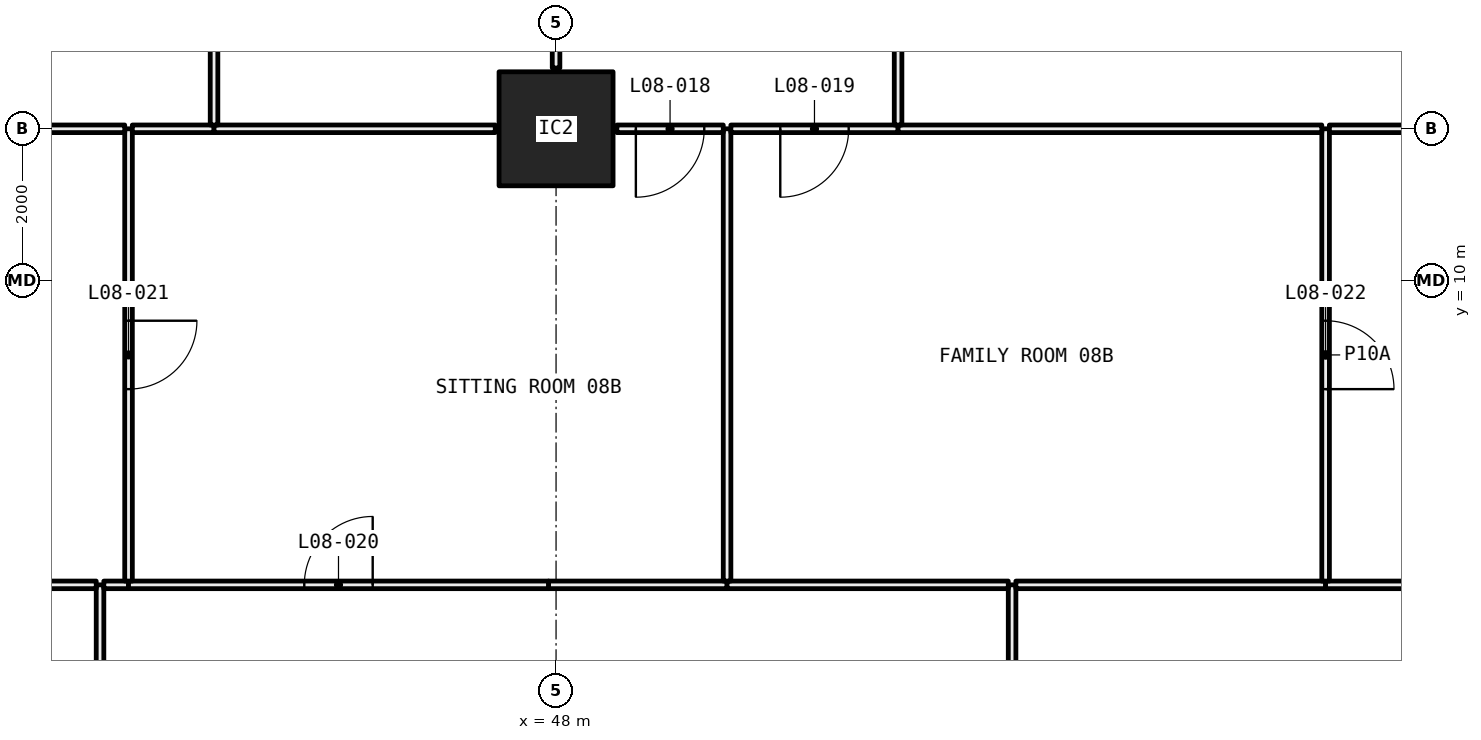
"""IFC4 building model, lengths in metres.
Left out: names, types, materials, properties, quantities, classifications, styles, units other than length and angle.
Written with IfcOpenShell. Run it as: python <this file> out.ifc"""

import sys

from ifc_helpers import new_model, si_unit, direction, frame, frame_2d, origin, origin_2d, place, context, subcontext, project, spatial, rectangle, hollow_rectangle, extrude, element, fill, save


model = new_model("IFC4")
c1 = context("Model", 3, precision=1e-05, world=origin(), true_north=direction((0.0, 1.0)))
c2 = subcontext(c1, "Body", "Model", "MODEL_VIEW")
j1 = project(units=[si_unit("LENGTHUNIT", "METRE"), si_unit("PLANEANGLEUNIT", "RADIAN")], contexts=[c1])
p1 = place(None, origin())
s1 = spatial("IfcSite", under=j1, at=p1, CompositionType="ELEMENT")
p2 = place(p1, origin())
s2 = spatial("IfcBuilding", under=s1, at=p2, CompositionType="ELEMENT")
p3 = place(p2, frame((0.0, 0.0, 40.35)))
s3 = spatial("IfcBuildingStorey", under=s2, at=p3, CompositionType="ELEMENT", Elevation=40.35)
p4 = place(p3, frame((48.0, 12.0, 0.0), z_axis=(0.0, 0.0, 1.0), x_axis=(1.0, 0.0, 0.0)))
e1 = element("IfcColumn", 1, at=p4, inside=s3, PredefinedType="COLUMN", context=c2, shape_type="SweptSolid", body=[
    extrude(hollow_rectangle(XDim=1.5, YDim=1.5, WallThickness=0.065, at=origin_2d()), origin(), (0.0, 0.0, 1.0), 3.05),
])
p5 = place(p3, frame((42.0, 0.72, 0.0), z_axis=(0.0, 0.0, 1.0), x_axis=(0.0, 1.0, 0.0)))
e2 = element("IfcWall", 2, at=p5, inside=s3, PredefinedType="PARTITIONING", context=c2, shape_type="SweptSolid", body=[
    extrude(rectangle(XDim=5.28, YDim=0.1, at=frame_2d((2.64, 0.0))), origin(), (0.0, 0.0, 1.0), 3.05),
])
p6 = place(p5, frame((2.19, 0.0, 0.0)))
e3 = element("IfcOpeningElement", 3, at=p6, cuts=e2, PredefinedType="OPENING", context=c2, shape_type="SweptSolid", body=[
    extrude(rectangle(XDim=0.9, YDim=2.1, at=frame_2d((0.45, 1.05))), frame((0.0, 0.06, 0.0), z_axis=(0.0, -1.0, 0.0), x_axis=(1.0, 0.0, 0.0)), (0.0, 0.0, 1.0), 0.12),
])
p7 = place(p3, frame((41.95, 6.0, 0.0), z_axis=(0.0, 0.0, 1.0), x_axis=(-1.0, 0.0, 0.0)))
e4 = element("IfcWall", 4, at=p7, inside=s3, PredefinedType="PARTITIONING", context=c2, shape_type="SweptSolid", body=[
    extrude(rectangle(XDim=5.9, YDim=0.1, at=frame_2d((2.95, 0.0))), origin(), (0.0, 0.0, 1.0), 2.45),
])
p8 = place(p3, frame((54.0, 0.72, 0.0), z_axis=(0.0, 0.0, 1.0), x_axis=(0.0, 1.0, 0.0)))
e5 = element("IfcWall", 5, at=p8, inside=s3, PredefinedType="PARTITIONING", context=c2, shape_type="SweptSolid", body=[
    extrude(rectangle(XDim=5.28, YDim=0.1, at=frame_2d((2.64, 0.0))), origin(), (0.0, 0.0, 1.0), 3.05),
])
p9 = place(p8, frame((2.19, 0.0, 0.0)))
e6 = element("IfcOpeningElement", 6, at=p9, cuts=e5, PredefinedType="OPENING", context=c2, shape_type="SweptSolid", body=[
    extrude(rectangle(XDim=0.9, YDim=2.1, at=frame_2d((0.45, 1.05))), frame((0.0, 0.06, 0.0), z_axis=(0.0, -1.0, 0.0), x_axis=(1.0, 0.0, 0.0)), (0.0, 0.0, 1.0), 0.12),
])
p10 = place(p3, frame((42.375, 6.0, 0.0), z_axis=(0.0, 0.0, 1.0), x_axis=(-1.0, 0.0, 0.0)))
e7 = element("IfcWall", 7, at=p10, inside=s3, PredefinedType="PARTITIONING", context=c2, shape_type="SweptSolid", body=[
    extrude(rectangle(XDim=0.325, YDim=0.1, at=frame_2d((0.163, 0.0))), origin(), (0.0, 0.0, 1.0), 3.05),
])
p11 = place(p3, frame((50.25, 6.0, 0.0), z_axis=(0.0, 0.0, 1.0), x_axis=(-1.0, 0.0, 0.0)))
e8 = element("IfcWall", 8, at=p11, inside=s3, PredefinedType="PARTITIONING", context=c2, shape_type="SweptSolid", body=[
    extrude(rectangle(XDim=2.35, YDim=0.1, at=frame_2d((1.175, 0.0))), origin(), (0.0, 0.0, 1.0), 2.45),
])
p12 = place(p3, frame((47.9, 6.0, 0.0), z_axis=(0.0, 0.0, 1.0), x_axis=(-1.0, 0.0, 0.0)))
e9 = element("IfcWall", 9, at=p12, inside=s3, PredefinedType="PARTITIONING", context=c2, shape_type="SweptSolid", body=[
    extrude(rectangle(XDim=5.525, YDim=0.1, at=frame_2d((2.762, 0.0))), origin(), (0.0, 0.0, 1.0), 3.05),
])
p13 = place(p12, frame((2.312, 0.0, 0.0)))
e10 = element("IfcOpeningElement", 10, at=p13, cuts=e9, PredefinedType="OPENING", context=c2, shape_type="SweptSolid", body=[
    extrude(rectangle(XDim=0.9, YDim=2.1, at=frame_2d((0.45, 1.05))), frame((0.0, 0.06, 0.0), z_axis=(0.0, -1.0, 0.0), x_axis=(1.0, 0.0, 0.0)), (0.0, 0.0, 1.0), 0.12),
])
p14 = place(p3, frame((53.95, 6.0, 0.0), z_axis=(0.0, 0.0, 1.0), x_axis=(-1.0, 0.0, 0.0)))
e11 = element("IfcWall", 11, at=p14, inside=s3, PredefinedType="PARTITIONING", context=c2, shape_type="SweptSolid", body=[
    extrude(rectangle(XDim=3.7, YDim=0.1, at=frame_2d((1.85, 0.0))), origin(), (0.0, 0.0, 1.0), 3.05),
])
p15 = place(p3, frame((58.125, 6.0, 0.0), z_axis=(0.0, 0.0, 1.0), x_axis=(-1.0, 0.0, 0.0)))
e12 = element("IfcWall", 12, at=p15, inside=s3, PredefinedType="PARTITIONING", context=c2, shape_type="SweptSolid", body=[
    extrude(rectangle(XDim=4.075, YDim=0.1, at=frame_2d((2.038, 0.0))), origin(), (0.0, 0.0, 1.0), 3.05),
])
p16 = place(p3, frame((59.95, 6.0, 0.0), z_axis=(0.0, 0.0, 1.0), x_axis=(-1.0, 0.0, 0.0)))
e13 = element("IfcWall", 13, at=p16, inside=s3, PredefinedType="PARTITIONING", context=c2, shape_type="SweptSolid", body=[
    extrude(rectangle(XDim=1.825, YDim=0.1, at=frame_2d((0.913, 0.0))), origin(), (0.0, 0.0, 1.0), 2.45),
])
p17 = place(p3, frame((42.375, 6.05, 0.0), z_axis=(0.0, 0.0, 1.0), x_axis=(0.0, 1.0, 0.0)))
e14 = element("IfcWall", 14, at=p17, inside=s3, PredefinedType="PARTITIONING", context=c2, shape_type="SweptSolid", body=[
    extrude(rectangle(XDim=5.95, YDim=0.1, at=frame_2d((2.975, 0.0))), origin(), (0.0, 0.0, 1.0), 2.45),
])
p18 = place(p17, frame((2.525, 0.0, 0.0)))
e15 = element("IfcOpeningElement", 15, at=p18, cuts=e14, PredefinedType="OPENING", context=c2, shape_type="SweptSolid", body=[
    extrude(rectangle(XDim=0.9, YDim=2.1, at=frame_2d((0.45, 1.05))), frame((0.0, 0.06, 0.0), z_axis=(0.0, -1.0, 0.0), x_axis=(1.0, 0.0, 0.0)), (0.0, 0.0, 1.0), 0.12),
])
p19 = place(p3, frame((42.325, 12.0, 0.0), z_axis=(0.0, 0.0, 1.0), x_axis=(-1.0, 0.0, 0.0)))
e16 = element("IfcWall", 16, at=p19, inside=s3, PredefinedType="PARTITIONING", context=c2, shape_type="SweptSolid", body=[
    extrude(rectangle(XDim=3.325, YDim=0.1, at=frame_2d((1.663, 0.0))), origin(), (0.0, 0.0, 1.0), 2.45),
])
p20 = place(p19, frame((1.212, 0.0, 0.0)))
e17 = element("IfcOpeningElement", 17, at=p20, cuts=e16, PredefinedType="OPENING", context=c2, shape_type="SweptSolid", body=[
    extrude(rectangle(XDim=0.9, YDim=2.1, at=frame_2d((0.45, 1.05))), frame((0.0, 0.06, 0.0), z_axis=(0.0, -1.0, 0.0), x_axis=(1.0, 0.0, 0.0)), (0.0, 0.0, 1.0), 0.12),
])
p21 = place(p3, frame((50.25, 6.05, 0.0), z_axis=(0.0, 0.0, 1.0), x_axis=(0.0, 1.0, 0.0)))
e18 = element("IfcWall", 18, at=p21, inside=s3, PredefinedType="PARTITIONING", context=c2, shape_type="SweptSolid", body=[
    extrude(rectangle(XDim=5.95, YDim=0.1, at=frame_2d((2.975, 0.0))), origin(), (0.0, 0.0, 1.0), 2.45),
])
p22 = place(p3, frame((43.5, 12.0, 0.0), z_axis=(0.0, 0.0, 1.0), x_axis=(-1.0, 0.0, 0.0)))
e19 = element("IfcWall", 19, at=p22, inside=s3, PredefinedType="PARTITIONING", context=c2, shape_type="SweptSolid", body=[
    extrude(rectangle(XDim=1.075, YDim=0.1, at=frame_2d((0.538, 0.0))), origin(), (0.0, 0.0, 1.0), 2.45),
])
p23 = place(p3, frame((47.2, 12.0, 0.0), z_axis=(0.0, 0.0, 1.0), x_axis=(-1.0, 0.0, 0.0)))
e20 = element("IfcWall", 20, at=p23, inside=s3, PredefinedType="PARTITIONING", context=c2, shape_type="SweptSolid", body=[
    extrude(rectangle(XDim=3.7, YDim=0.1, at=frame_2d((1.85, 0.0))), origin(), (0.0, 0.0, 1.0), 2.45),
])
p24 = place(p3, frame((50.2, 12.0, 0.0), z_axis=(0.0, 0.0, 1.0), x_axis=(-1.0, 0.0, 0.0)))
e21 = element("IfcWall", 21, at=p24, inside=s3, PredefinedType="PARTITIONING", context=c2, shape_type="SweptSolid", body=[
    extrude(rectangle(XDim=1.4, YDim=0.1, at=frame_2d((0.7, 0.0))), origin(), (0.0, 0.0, 1.0), 2.45),
])
p25 = place(p24, frame((0.25, 0.0, 0.0)))
e22 = element("IfcOpeningElement", 22, at=p25, cuts=e21, PredefinedType="OPENING", context=c2, shape_type="SweptSolid", body=[
    extrude(rectangle(XDim=0.9, YDim=2.1, at=frame_2d((0.45, 1.05))), frame((0.0, 0.06, 0.0), z_axis=(0.0, -1.0, 0.0), x_axis=(1.0, 0.0, 0.0)), (0.0, 0.0, 1.0), 0.12),
])
p26 = place(p3, frame((58.125, 6.05, 0.0), z_axis=(0.0, 0.0, 1.0), x_axis=(0.0, 1.0, 0.0)))
e23 = element("IfcWall", 23, at=p26, inside=s3, PredefinedType="PARTITIONING", context=c2, shape_type="SweptSolid", body=[
    extrude(rectangle(XDim=5.95, YDim=0.1, at=frame_2d((2.975, 0.0))), origin(), (0.0, 0.0, 1.0), 2.45),
])
p27 = place(p26, frame((2.525, 0.0, 0.0)))
e24 = element("IfcOpeningElement", 24, at=p27, cuts=e23, PredefinedType="OPENING", context=c2, shape_type="SweptSolid", body=[
    extrude(rectangle(XDim=0.9, YDim=2.1, at=frame_2d((0.45, 1.05))), frame((0.0, 0.06, 0.0), z_axis=(0.0, -1.0, 0.0), x_axis=(1.0, 0.0, 0.0)), (0.0, 0.0, 1.0), 0.12),
])
p28 = place(p3, frame((52.5, 12.0, 0.0), z_axis=(0.0, 0.0, 1.0), x_axis=(-1.0, 0.0, 0.0)))
e25 = element("IfcWall", 25, at=p28, inside=s3, PredefinedType="PARTITIONING", context=c2, shape_type="SweptSolid", body=[
    extrude(rectangle(XDim=2.2, YDim=0.1, at=frame_2d((1.1, 0.0))), origin(), (0.0, 0.0, 1.0), 2.45),
])
p29 = place(p28, frame((0.65, 0.0, 0.0)))
e26 = element("IfcOpeningElement", 26, at=p29, cuts=e25, PredefinedType="OPENING", context=c2, shape_type="SweptSolid", body=[
    extrude(rectangle(XDim=0.9, YDim=2.1, at=frame_2d((0.45, 1.05))), frame((0.0, 0.06, 0.0), z_axis=(0.0, -1.0, 0.0), x_axis=(1.0, 0.0, 0.0)), (0.0, 0.0, 1.0), 0.12),
])
p30 = place(p3, frame((58.075, 12.0, 0.0), z_axis=(0.0, 0.0, 1.0), x_axis=(-1.0, 0.0, 0.0)))
e27 = element("IfcWall", 27, at=p30, inside=s3, PredefinedType="PARTITIONING", context=c2, shape_type="SweptSolid", body=[
    extrude(rectangle(XDim=5.575, YDim=0.1, at=frame_2d((2.788, 0.0))), origin(), (0.0, 0.0, 1.0), 2.45),
])
p31 = place(p3, frame((59.2, 12.0, 0.0), z_axis=(0.0, 0.0, 1.0), x_axis=(-1.0, 0.0, 0.0)))
e28 = element("IfcWall", 28, at=p31, inside=s3, PredefinedType="PARTITIONING", context=c2, shape_type="SweptSolid", body=[
    extrude(rectangle(XDim=1.025, YDim=0.1, at=frame_2d((0.512, 0.0))), origin(), (0.0, 0.0, 1.0), 2.45),
])
p32 = place(p3, frame((43.5, 12.05, 0.0), z_axis=(0.0, 0.0, 1.0), x_axis=(0.0, 1.0, 0.0)))
e29 = element("IfcWall", 29, at=p32, inside=s3, PredefinedType="PARTITIONING", context=c2, shape_type="SweptSolid", body=[
    extrude(rectangle(XDim=5.85, YDim=0.1, at=frame_2d((2.925, 0.0))), origin(), (0.0, 0.0, 1.0), 2.45),
])
p33 = place(p3, frame((48.0, 12.8, 0.0), z_axis=(0.0, 0.0, 1.0), x_axis=(0.0, 1.0, 0.0)))
e30 = element("IfcWall", 30, at=p33, inside=s3, PredefinedType="PARTITIONING", context=c2, shape_type="SweptSolid", body=[
    extrude(rectangle(XDim=5.1, YDim=0.1, at=frame_2d((2.55, 0.0))), origin(), (0.0, 0.0, 1.0), 3.05),
])
p34 = place(p33, frame((2.1, 0.0, 0.0)))
e31 = element("IfcOpeningElement", 31, at=p34, cuts=e30, PredefinedType="OPENING", context=c2, shape_type="SweptSolid", body=[
    extrude(rectangle(XDim=0.9, YDim=2.1, at=frame_2d((0.45, 1.05))), frame((0.0, 0.06, 0.0), z_axis=(0.0, -1.0, 0.0), x_axis=(1.0, 0.0, 0.0)), (0.0, 0.0, 1.0), 0.12),
])
p35 = place(p3, frame((52.5, 12.05, 0.0), z_axis=(0.0, 0.0, 1.0), x_axis=(0.0, 1.0, 0.0)))
e32 = element("IfcWall", 32, at=p35, inside=s3, PredefinedType="PARTITIONING", context=c2, shape_type="SweptSolid", body=[
    extrude(rectangle(XDim=5.85, YDim=0.1, at=frame_2d((2.925, 0.0))), origin(), (0.0, 0.0, 1.0), 2.45),
])
p36 = place(p35, frame((2.475, 0.0, 0.0)))
e33 = element("IfcOpeningElement", 33, at=p36, cuts=e32, PredefinedType="OPENING", context=c2, shape_type="SweptSolid", body=[
    extrude(rectangle(XDim=0.9, YDim=2.1, at=frame_2d((0.45, 1.05))), frame((0.0, 0.06, 0.0), z_axis=(0.0, -1.0, 0.0), x_axis=(1.0, 0.0, 0.0)), (0.0, 0.0, 1.0), 0.12),
])
p37 = place(p25, origin())
e34 = element("IfcDoor", 34, at=p37, inside=s3, OperationType="SINGLE_SWING_LEFT", PredefinedType="DOOR", context=c2, shape_type="SweptSolid", body=[
    extrude(rectangle(XDim=0.9, YDim=2.1, at=frame_2d((0.45, 1.05))), frame((0.0, 0.025, 0.0), z_axis=(0.0, -1.0, 0.0), x_axis=(1.0, 0.0, 0.0)), (0.0, 0.0, 1.0), 0.05),
])
fill(e22, e34)
p38 = place(p29, origin())
e35 = element("IfcDoor", 35, at=p38, inside=s3, OperationType="SINGLE_SWING_LEFT", PredefinedType="DOOR", context=c2, shape_type="SweptSolid", body=[
    extrude(rectangle(XDim=0.9, YDim=2.1, at=frame_2d((0.45, 1.05))), frame((0.0, 0.025, 0.0), z_axis=(0.0, -1.0, 0.0), x_axis=(1.0, 0.0, 0.0)), (0.0, 0.0, 1.0), 0.05),
])
fill(e26, e35)
p39 = place(p13, frame((0.9, 0.0, 0.0), x_axis=(-1.0, 0.0, 0.0)))
e36 = element("IfcDoor", 36, at=p39, inside=s3, OperationType="SINGLE_SWING_LEFT", PredefinedType="DOOR", context=c2, shape_type="SweptSolid", body=[
    extrude(rectangle(XDim=0.9, YDim=2.1, at=frame_2d((0.45, 1.05))), frame((0.0, 0.025, 0.0), z_axis=(0.0, -1.0, 0.0), x_axis=(1.0, 0.0, 0.0)), (0.0, 0.0, 1.0), 0.05),
])
fill(e10, e36)
p40 = place(p18, frame((0.9, 0.0, 0.0), x_axis=(-1.0, 0.0, 0.0)))
e37 = element("IfcDoor", 37, at=p40, inside=s3, OperationType="SINGLE_SWING_RIGHT", PredefinedType="DOOR", context=c2, shape_type="SweptSolid", body=[
    extrude(rectangle(XDim=0.9, YDim=2.1, at=frame_2d((0.45, 1.05))), frame((0.0, 0.025, 0.0), z_axis=(0.0, -1.0, 0.0), x_axis=(1.0, 0.0, 0.0)), (0.0, 0.0, 1.0), 0.05),
])
fill(e15, e37)
p41 = place(p27, frame((0.9, 0.0, 0.0), x_axis=(-1.0, 0.0, 0.0)))
e38 = element("IfcDoor", 38, at=p41, inside=s3, OperationType="SINGLE_SWING_LEFT", PredefinedType="DOOR", context=c2, shape_type="SweptSolid", body=[
    extrude(rectangle(XDim=0.9, YDim=2.1, at=frame_2d((0.45, 1.05))), frame((0.0, 0.025, 0.0), z_axis=(0.0, -1.0, 0.0), x_axis=(1.0, 0.0, 0.0)), (0.0, 0.0, 1.0), 0.05),
])
fill(e24, e38)
save(model, sys.argv[1])
